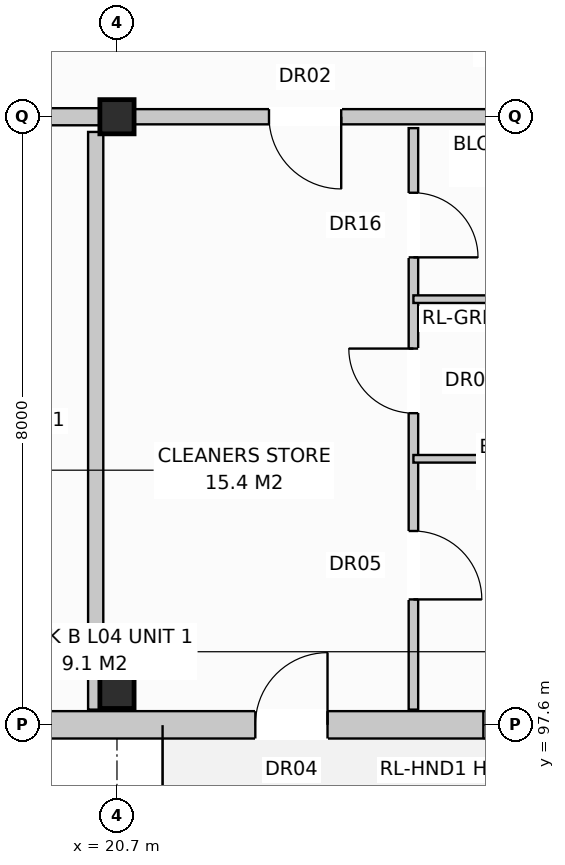
"""IFC4 building model, lengths in metres.
Left out: names, types, materials, properties, quantities, classifications, styles, units other than length and angle.
Written with IfcOpenShell. Run it as: python <this file> out.ifc"""

import sys

from ifc_helpers import new_model, si_unit, direction, frame, frame_2d, origin, origin_with_axes, origin_2d, place, context, subcontext, project, spatial, rectangle, extrude, element, fill, save


model = new_model("IFC4")
c1 = context("Model", 3, precision=1e-05, world=origin(), true_north=direction((0.0, 1.0)))
c2 = subcontext(c1, "Body", "Model", "MODEL_VIEW")
j1 = project(units=[si_unit("LENGTHUNIT", "METRE"), si_unit("PLANEANGLEUNIT", "RADIAN")], contexts=[c1])
p1 = place(None, origin())
s1 = spatial("IfcSite", under=j1, at=p1, CompositionType="ELEMENT")
p2 = place(p1, origin())
s2 = spatial("IfcBuilding", under=s1, at=p2, CompositionType="ELEMENT")
p3 = place(p2, frame((0.0, 0.0, 14.4)))
s3 = spatial("IfcBuildingStorey", under=s2, at=p3, CompositionType="ELEMENT", Elevation=14.4)
for number, where, z_axis, x_axis in (
    (1, (20.7, 98.04, 0.0), (0.0, 0.0, 1.0), (1.0, 0.0, 0.0)),
    (2, (20.7, 105.6, 0.0), (0.0, 0.0, 1.0), (1.0, 0.0, 0.0)),
):
    element("IfcColumn", number, at=place(p3, frame(where, z_axis=z_axis, x_axis=x_axis)), inside=s3, PredefinedType="COLUMN", context=c2, shape_type="SweptSolid", body=[
        extrude(rectangle(XDim=0.45, YDim=0.45, at=origin_2d()), origin(), (0.0, 0.0, 1.0), 3.2),
    ])
p4 = place(p3, frame((10.65, 97.6, 0.0), z_axis=(0.0, 0.0, 1.0), x_axis=(1.0, 0.0, 0.0)))
e3 = element("IfcWall", 3, at=p4, inside=s3, PredefinedType="STANDARD", context=c2, shape_type="SweptSolid", body=[
    extrude(rectangle(XDim=17.4, YDim=0.36, at=frame_2d((8.7, 0.0))), origin(), (0.0, 0.0, 1.0), 2.94),
])
p5 = place(p4, frame((11.87, 0.0, 0.0)))
e4 = element("IfcOpeningElement", 4, at=p5, cuts=e3, PredefinedType="OPENING", context=c2, shape_type="SweptSolid", body=[
    extrude(rectangle(XDim=0.95, YDim=2.1, at=frame_2d((0.475, 1.05))), frame((0.0, 0.192, 0.0), z_axis=(0.0, -1.0, 0.0), x_axis=(1.0, 0.0, 0.0)), (0.0, 0.0, 1.0), 0.384),
])
p6 = place(p4, frame((14.87, 0.0, 0.72)))
e5 = element("IfcOpeningElement", 5, at=p6, cuts=e3, PredefinedType="OPENING", context=c2, shape_type="SweptSolid", body=[
    extrude(rectangle(XDim=1.1, YDim=1.5, at=frame_2d((0.55, 0.75))), frame((0.0, 0.192, 0.0), z_axis=(0.0, -1.0, 0.0), x_axis=(1.0, 0.0, 0.0)), (0.0, 0.0, 1.0), 0.384),
])
p7 = place(p3, frame((20.42, 97.8, 0.0), z_axis=(0.0, 0.0, 1.0), x_axis=(0.0, 1.0, 0.0)))
e6 = element("IfcWall", 6, at=p7, inside=s3, PredefinedType="PARTITIONING", context=c2, shape_type="SweptSolid", body=[
    extrude(rectangle(XDim=7.6, YDim=0.2, at=frame_2d((3.8, 0.0))), origin(), (0.0, 0.0, 1.0), 2.94),
])
p8 = place(p3, frame((10.8, 105.6, 0.0), z_axis=(0.0, 0.0, 1.0), x_axis=(1.0, 0.0, 0.0)))
e7 = element("IfcWall", 7, at=p8, inside=s3, PredefinedType="PARTITIONING", context=c2, shape_type="SweptSolid", body=[
    extrude(rectangle(XDim=9.9, YDim=0.225, at=frame_2d((4.95, 0.0))), origin(), (0.0, 0.0, 1.0), 2.38),
])
p9 = place(p8, frame((0.475, 0.0, 0.0)))
e8 = element("IfcOpeningElement", 8, at=p9, cuts=e7, PredefinedType="OPENING", context=c2, shape_type="SweptSolid", body=[
    extrude(rectangle(XDim=1.1, YDim=2.15, at=frame_2d((0.55, 1.075))), frame((0.0, 0.125, 0.0), z_axis=(0.0, -1.0, 0.0), x_axis=(1.0, 0.0, 0.0)), (0.0, 0.0, 1.0), 0.249),
])
p10 = place(p8, frame((5.75, 0.0, 0.0)))
e9 = element("IfcOpeningElement", 9, at=p10, cuts=e7, PredefinedType="OPENING", context=c2, shape_type="SweptSolid", body=[
    extrude(rectangle(XDim=0.9, YDim=2.1, at=frame_2d((0.45, 1.05))), frame((0.0, 0.125, 0.0), z_axis=(0.0, -1.0, 0.0), x_axis=(1.0, 0.0, 0.0)), (0.0, 0.0, 1.0), 0.249),
])
p11 = place(p8, frame((7.8, 0.0, 0.0)))
e10 = element("IfcOpeningElement", 10, at=p11, cuts=e7, PredefinedType="OPENING", context=c2, shape_type="SweptSolid", body=[
    extrude(rectangle(XDim=0.95, YDim=2.15, at=frame_2d((0.475, 1.075))), frame((0.0, 0.125, 0.0), z_axis=(0.0, -1.0, 0.0), x_axis=(1.0, 0.0, 0.0)), (0.0, 0.0, 1.0), 0.249),
])
p12 = place(p3, frame((20.7, 105.6, 0.0), z_axis=(0.0, 0.0, 1.0), x_axis=(1.0, 0.0, 0.0)))
e11 = element("IfcWall", 11, at=p12, inside=s3, PredefinedType="PARTITIONING", context=c2, shape_type="SweptSolid", body=[
    extrude(rectangle(XDim=6.9, YDim=0.2, at=frame_2d((3.45, 0.0))), origin(), (0.0, 0.0, 1.0), 2.38),
])
p13 = place(p12, frame((2.0, 0.0, 0.0)))
e12 = element("IfcOpeningElement", 12, at=p13, cuts=e11, PredefinedType="OPENING", context=c2, shape_type="SweptSolid", body=[
    extrude(rectangle(XDim=0.95, YDim=2.15, at=frame_2d((0.475, 1.075))), frame((0.0, 0.112, 0.0), z_axis=(0.0, -1.0, 0.0), x_axis=(1.0, 0.0, 0.0)), (0.0, 0.0, 1.0), 0.224),
])
p14 = place(p3, frame((24.6, 105.45, 0.0), z_axis=(0.0, 0.0, 1.0), x_axis=(0.0, -1.0, 0.0)))
e13 = element("IfcWall", 13, at=p14, inside=s3, PredefinedType="PARTITIONING", context=c2, shape_type="SweptSolid", body=[
    extrude(rectangle(XDim=7.65, YDim=0.125, at=frame_2d((3.825, 0.0))), origin(), (0.0, 0.0, 1.0), 2.94),
])
p15 = place(p14, frame((0.85, 0.0, 0.0)))
e14 = element("IfcOpeningElement", 14, at=p15, cuts=e13, PredefinedType="OPENING", context=c2, shape_type="SweptSolid", body=[
    extrude(rectangle(XDim=0.85, YDim=2.1, at=frame_2d((0.425, 1.05))), frame((0.0, 0.074, 0.0), z_axis=(0.0, -1.0, 0.0), x_axis=(1.0, 0.0, 0.0)), (0.0, 0.0, 1.0), 0.149),
])
p16 = place(p14, frame((2.9, 0.0, 0.0)))
e15 = element("IfcOpeningElement", 15, at=p16, cuts=e13, PredefinedType="OPENING", context=c2, shape_type="SweptSolid", body=[
    extrude(rectangle(XDim=0.85, YDim=2.05, at=frame_2d((0.425, 1.025))), frame((0.0, 0.074, 0.0), z_axis=(0.0, -1.0, 0.0), x_axis=(1.0, 0.0, 0.0)), (0.0, 0.0, 1.0), 0.149),
])
p17 = place(p14, frame((5.3, 0.0, 0.0)))
e16 = element("IfcOpeningElement", 16, at=p17, cuts=e13, PredefinedType="OPENING", context=c2, shape_type="SweptSolid", body=[
    extrude(rectangle(XDim=0.9, YDim=2.1, at=frame_2d((0.45, 1.05))), frame((0.0, 0.074, 0.0), z_axis=(0.0, -1.0, 0.0), x_axis=(1.0, 0.0, 0.0)), (0.0, 0.0, 1.0), 0.149),
])
for number, where, z_axis, x_axis in (
    (17, (24.6, 103.2, 0.0), (0.0, 0.0, 1.0), (1.0, 0.0, 0.0)),
    (18, (24.6, 101.1, 0.0), (0.0, 0.0, 1.0), (1.0, 0.0, 0.0)),
):
    element("IfcWall", number, at=place(p3, frame(where, z_axis=z_axis, x_axis=x_axis)), inside=s3, PredefinedType="PARTITIONING", context=c2, shape_type="SweptSolid", body=[
        extrude(rectangle(XDim=2.9, YDim=0.1, at=frame_2d((1.45, 0.0))), origin(), (0.0, 0.0, 1.0), 2.94),
    ])
p18 = place(p5, origin_with_axes())
e19 = element("IfcDoor", 19, at=p18, inside=s3, OperationType="SINGLE_SWING_RIGHT", PredefinedType="DOOR", context=c2, shape_type="SweptSolid", body=[
    extrude(rectangle(XDim=0.95, YDim=2.1, at=frame_2d((0.475, 1.05))), frame((0.0, 0.025, 0.0), z_axis=(0.0, -1.0, 0.0), x_axis=(1.0, 0.0, 0.0)), (0.0, 0.0, 1.0), 0.05),
])
fill(e4, e19)
p19 = place(p6, origin_with_axes())
e20 = element("IfcWindow", 20, at=p19, inside=s3, PartitioningType="SINGLE_PANEL", PredefinedType="WINDOW", context=c2, shape_type="SweptSolid", body=[
    extrude(rectangle(XDim=1.1, YDim=1.5, at=frame_2d((0.55, 0.75))), frame((0.0, 0.03, 0.0), z_axis=(0.0, -1.0, 0.0), x_axis=(1.0, 0.0, 0.0)), (0.0, 0.0, 1.0), 0.06),
])
fill(e5, e20)
p20 = place(p13, frame((0.95, 0.0, 0.0), z_axis=(0.0, 0.0, 1.0), x_axis=(-1.0, 0.0, 0.0)))
e21 = element("IfcDoor", 21, at=p20, inside=s3, OperationType="SINGLE_SWING_RIGHT", PredefinedType="DOOR", context=c2, shape_type="SweptSolid", body=[
    extrude(rectangle(XDim=0.95, YDim=2.15, at=frame_2d((0.475, 1.075))), frame((0.0, 0.025, 0.0), z_axis=(0.0, -1.0, 0.0), x_axis=(1.0, 0.0, 0.0)), (0.0, 0.0, 1.0), 0.05),
])
fill(e12, e21)
p21 = place(p15, origin_with_axes())
e22 = element("IfcDoor", 22, at=p21, inside=s3, OperationType="SINGLE_SWING_RIGHT", PredefinedType="DOOR", context=c2, shape_type="SweptSolid", body=[
    extrude(rectangle(XDim=0.85, YDim=2.1, at=frame_2d((0.425, 1.05))), frame((0.0, 0.025, 0.0), z_axis=(0.0, -1.0, 0.0), x_axis=(1.0, 0.0, 0.0)), (0.0, 0.0, 1.0), 0.05),
])
fill(e14, e22)
p22 = place(p16, frame((0.85, 0.0, 0.0), z_axis=(0.0, 0.0, 1.0), x_axis=(-1.0, 0.0, 0.0)))
e23 = element("IfcDoor", 23, at=p22, inside=s3, OperationType="SINGLE_SWING_LEFT", PredefinedType="DOOR", context=c2, shape_type="SweptSolid", body=[
    extrude(rectangle(XDim=0.85, YDim=2.05, at=frame_2d((0.425, 1.025))), frame((0.0, 0.025, 0.0), z_axis=(0.0, -1.0, 0.0), x_axis=(1.0, 0.0, 0.0)), (0.0, 0.0, 1.0), 0.05),
])
fill(e15, e23)
p23 = place(p17, origin_with_axes())
e24 = element("IfcDoor", 24, at=p23, inside=s3, OperationType="SINGLE_SWING_RIGHT", PredefinedType="DOOR", context=c2, shape_type="SweptSolid", body=[
    extrude(rectangle(XDim=0.9, YDim=2.1, at=frame_2d((0.45, 1.05))), frame((0.0, 0.025, 0.0), z_axis=(0.0, -1.0, 0.0), x_axis=(1.0, 0.0, 0.0)), (0.0, 0.0, 1.0), 0.05),
])
fill(e16, e24)
save(model, sys.argv[1])
